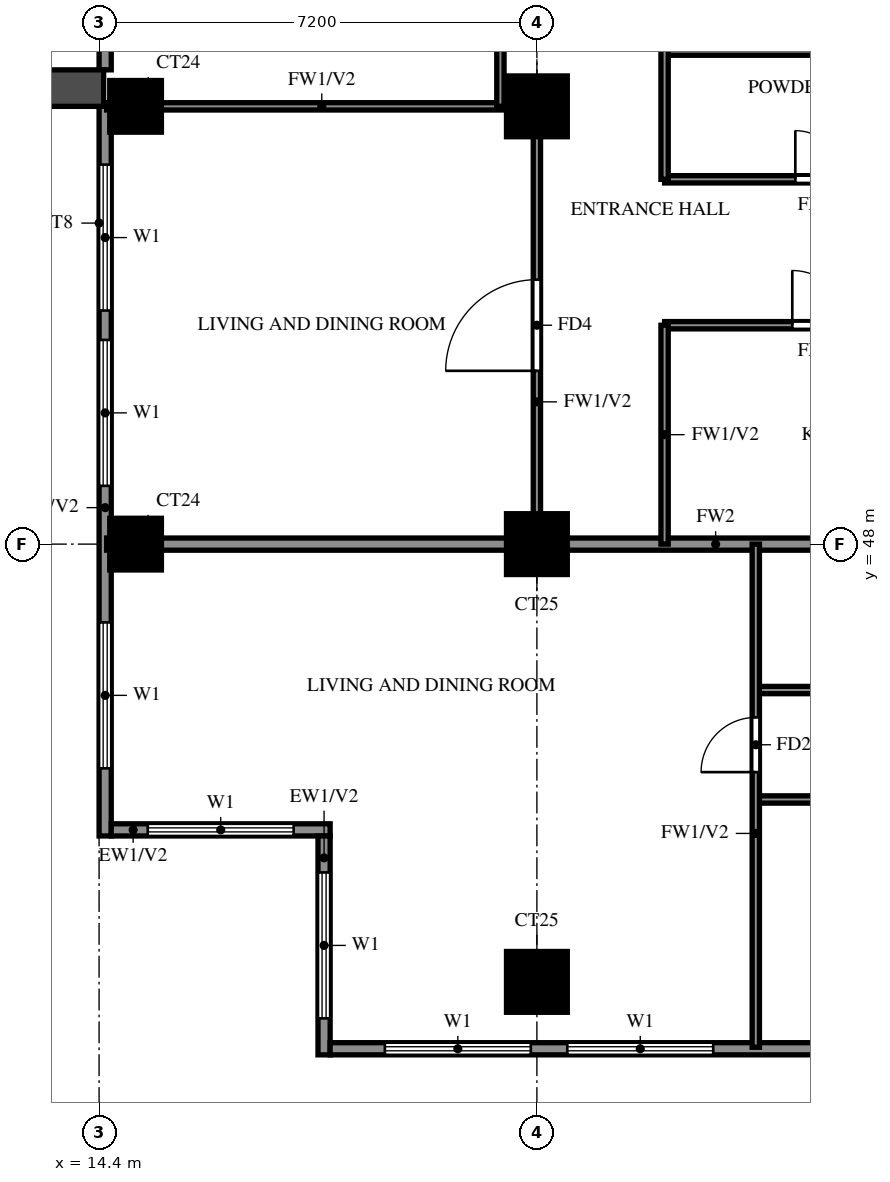
"""IFC4 building model, lengths in metres.
Left out: names, types, materials, properties, quantities, classifications, styles, units other than length and angle.
Written with IfcOpenShell. Run it as: python <this file> out.ifc"""

import sys

from ifc_helpers import new_model, si_unit, direction, frame, frame_2d, origin, origin_2d, place, context, subcontext, project, spatial, rectangle, extrude, source, transform, mapped, element, fill, save


model = new_model("IFC4")
c1 = context("Model", 3, precision=1e-05, world=origin(), true_north=direction((0.0, 1.0)))
c2 = subcontext(c1, "Body", "Model", "MODEL_VIEW")
j1 = project(units=[si_unit("LENGTHUNIT", "METRE"), si_unit("PLANEANGLEUNIT", "RADIAN")], contexts=[c1])
p1 = place(None, origin())
s1 = spatial("IfcSite", under=j1, at=p1, CompositionType="ELEMENT")
p2 = place(p1, origin())
s2 = spatial("IfcBuilding", under=s1, at=p2, CompositionType="ELEMENT")
p3 = place(p2, frame((0.0, 0.0, 143.0)))
s3 = spatial("IfcBuildingStorey", under=s2, at=p3, CompositionType="ELEMENT", Elevation=143.0)
m1 = source(origin(), c2, "Body", "SweptSolid", [
    extrude(rectangle(XDim=1.0, YDim=1.0, at=origin_2d()), origin(), (0.0, 0.0, 1.0), 3.2),
])
p4 = place(p3, frame((21.6, 40.8, 0.0), z_axis=(0.0, 0.0, 1.0), x_axis=(1.0, 0.0, 0.0)))
e1 = element("IfcColumn", 1, at=p4, inside=s3, PredefinedType="COLUMN", context=c2, shape_type="MappedRepresentation", body=[
    mapped(m1, transform((0.0, 0.0, 0.0))),
])
m2 = source(origin(), c2, "Body", "SweptSolid", [
    extrude(rectangle(XDim=0.85, YDim=0.85, at=origin_2d()), origin(), (0.0, 0.0, 1.0), 3.2),
])
p5 = place(p3, frame((15.0, 48.0, 0.0), z_axis=(0.0, 0.0, 1.0), x_axis=(1.0, 0.0, 0.0)))
e2 = element("IfcColumn", 2, at=p5, inside=s3, PredefinedType="COLUMN", context=c2, shape_type="MappedRepresentation", body=[
    mapped(m2, transform((0.0, 0.0, 0.0))),
])
p6 = place(p3, frame((21.6, 48.0, 0.0), z_axis=(0.0, 0.0, 1.0), x_axis=(1.0, 0.0, 0.0)))
e3 = element("IfcColumn", 3, at=p6, inside=s3, PredefinedType="COLUMN", context=c2, shape_type="MappedRepresentation", body=[
    mapped(m1, transform((0.0, 0.0, 0.0))),
])
p7 = place(p3, frame((15.0, 55.2, 0.0), z_axis=(0.0, 0.0, 1.0), x_axis=(1.0, 0.0, 0.0)))
e4 = element("IfcColumn", 4, at=p7, inside=s3, PredefinedType="COLUMN", context=c2, shape_type="MappedRepresentation", body=[
    mapped(m2, transform((0.0, 0.0, 0.0))),
])
p8 = place(p3, frame((21.6, 55.2, 0.0), z_axis=(0.0, 0.0, 1.0), x_axis=(1.0, 0.0, 0.0)))
e5 = element("IfcColumn", 5, at=p8, inside=s3, PredefinedType="COLUMN", context=c2, shape_type="MappedRepresentation", body=[
    mapped(m1, transform((0.0, 0.0, 0.0))),
])
p9 = place(p3, frame((14.5, 61.8, 0.0), z_axis=(0.0, 0.0, 1.0), x_axis=(0.0, -1.0, 0.0)))
e6 = element("IfcWall", 6, at=p9, inside=s3, PredefinedType="SOLIDWALL", context=c2, shape_type="SweptSolid", body=[
    extrude(rectangle(XDim=6.0, YDim=0.2, at=frame_2d((3.0, 0.0))), origin(), (0.0, 0.0, 1.0), 3.2),
])
p10 = place(p9, frame((0.9, 0.0, 0.0)))
e7 = element("IfcOpeningElement", 7, at=p10, cuts=e6, PredefinedType="OPENING", context=c2, shape_type="SweptSolid", body=[
    extrude(rectangle(XDim=1.8, YDim=2.4, at=frame_2d((0.9, 1.2))), frame((0.0, 0.11, 0.0), z_axis=(0.0, -1.0, 0.0), x_axis=(1.0, 0.0, 0.0)), (0.0, 0.0, 1.0), 0.22),
])
p11 = place(p9, frame((3.95, 0.0, 1.5)))
e8 = element("IfcOpeningElement", 8, at=p11, cuts=e6, PredefinedType="OPENING", context=c2, shape_type="SweptSolid", body=[
    extrude(rectangle(XDim=0.9, YDim=0.9, at=frame_2d((0.45, 0.45))), frame((0.0, 0.11, 0.0), z_axis=(0.0, -1.0, 0.0), x_axis=(1.0, 0.0, 0.0)), (0.0, 0.0, 1.0), 0.22),
])
p12 = place(p3, frame((14.5, 55.2, 0.0), z_axis=(0.0, 0.0, 1.0), x_axis=(0.0, -1.0, 0.0)))
e9 = element("IfcWall", 9, at=p12, inside=s3, PredefinedType="SOLIDWALL", context=c2, shape_type="SweptSolid", body=[
    extrude(rectangle(XDim=12.0, YDim=0.2, at=frame_2d((6.0, 0.0))), origin(), (0.0, 0.0, 1.0), 3.2),
])
p13 = place(p12, frame((8.488, 0.0, 0.6)))
e10 = element("IfcOpeningElement", 10, at=p13, cuts=e9, PredefinedType="OPENING", context=c2, shape_type="SweptSolid", body=[
    extrude(rectangle(XDim=2.4, YDim=2.4, at=frame_2d((1.2, 1.2))), frame((0.0, 0.11, 0.0), z_axis=(0.0, -1.0, 0.0), x_axis=(1.0, 0.0, 0.0)), (0.0, 0.0, 1.0), 0.22),
])
p14 = place(p12, frame((0.958, 0.0, 0.6)))
e11 = element("IfcOpeningElement", 11, at=p14, cuts=e9, PredefinedType="OPENING", context=c2, shape_type="SweptSolid", body=[
    extrude(rectangle(XDim=2.4, YDim=2.4, at=frame_2d((1.2, 1.2))), frame((0.0, 0.11, 0.0), z_axis=(0.0, -1.0, 0.0), x_axis=(1.0, 0.0, 0.0)), (0.0, 0.0, 1.0), 0.22),
])
p15 = place(p12, frame((3.842, 0.0, 0.6)))
e12 = element("IfcOpeningElement", 12, at=p15, cuts=e9, PredefinedType="OPENING", context=c2, shape_type="SweptSolid", body=[
    extrude(rectangle(XDim=2.4, YDim=2.4, at=frame_2d((1.2, 1.2))), frame((0.0, 0.11, 0.0), z_axis=(0.0, -1.0, 0.0), x_axis=(1.0, 0.0, 0.0)), (0.0, 0.0, 1.0), 0.22),
])
p16 = place(p3, frame((14.6, 43.3, 0.0), z_axis=(0.0, 0.0, 1.0), x_axis=(1.0, 0.0, 0.0)))
e13 = element("IfcWall", 13, at=p16, inside=s3, PredefinedType="SOLIDWALL", context=c2, shape_type="SweptSolid", body=[
    extrude(rectangle(XDim=3.6, YDim=0.2, at=frame_2d((1.8, 0.0))), origin(), (0.0, 0.0, 1.0), 3.2),
])
p17 = place(p16, frame((0.6, 0.0, 0.6)))
e14 = element("IfcOpeningElement", 14, at=p17, cuts=e13, PredefinedType="OPENING", context=c2, shape_type="SweptSolid", body=[
    extrude(rectangle(XDim=2.4, YDim=2.4, at=frame_2d((1.2, 1.2))), frame((0.0, 0.11, 0.0), z_axis=(0.0, -1.0, 0.0), x_axis=(1.0, 0.0, 0.0)), (0.0, 0.0, 1.0), 0.22),
])
p18 = place(p3, frame((18.1, 43.2, 0.0), z_axis=(0.0, 0.0, 1.0), x_axis=(0.0, -1.0, 0.0)))
e15 = element("IfcWall", 15, at=p18, inside=s3, PredefinedType="SOLIDWALL", context=c2, shape_type="SweptSolid", body=[
    extrude(rectangle(XDim=3.6, YDim=0.2, at=frame_2d((1.8, 0.0))), origin(), (0.0, 0.0, 1.0), 3.2),
])
p19 = place(p18, frame((0.6, 0.0, 0.6)))
e16 = element("IfcOpeningElement", 16, at=p19, cuts=e15, PredefinedType="OPENING", context=c2, shape_type="SweptSolid", body=[
    extrude(rectangle(XDim=2.4, YDim=2.4, at=frame_2d((1.2, 1.2))), frame((0.0, 0.11, 0.0), z_axis=(0.0, -1.0, 0.0), x_axis=(1.0, 0.0, 0.0)), (0.0, 0.0, 1.0), 0.22),
])
p20 = place(p3, frame((18.2, 39.7, 0.0), z_axis=(0.0, 0.0, 1.0), x_axis=(1.0, 0.0, 0.0)))
e17 = element("IfcWall", 17, at=p20, inside=s3, PredefinedType="SOLIDWALL", context=c2, shape_type="SweptSolid", body=[
    extrude(rectangle(XDim=23.8, YDim=0.2, at=frame_2d((11.9, 0.0))), origin(), (0.0, 0.0, 1.0), 3.2),
])
p21 = place(p20, frame((0.9, 0.0, 0.6)))
e18 = element("IfcOpeningElement", 18, at=p21, cuts=e17, PredefinedType="OPENING", context=c2, shape_type="SweptSolid", body=[
    extrude(rectangle(XDim=2.4, YDim=2.4, at=frame_2d((1.2, 1.2))), frame((0.0, 0.11, 0.0), z_axis=(0.0, -1.0, 0.0), x_axis=(1.0, 0.0, 0.0)), (0.0, 0.0, 1.0), 0.22),
])
p22 = place(p20, frame((3.9, 0.0, 0.6)))
e19 = element("IfcOpeningElement", 19, at=p22, cuts=e17, PredefinedType="OPENING", context=c2, shape_type="SweptSolid", body=[
    extrude(rectangle(XDim=2.4, YDim=2.4, at=frame_2d((1.2, 1.2))), frame((0.0, 0.11, 0.0), z_axis=(0.0, -1.0, 0.0), x_axis=(1.0, 0.0, 0.0)), (0.0, 0.0, 1.0), 0.22),
])
p23 = place(p20, frame((8.35, 0.0, 1.5)))
e20 = element("IfcOpeningElement", 20, at=p23, cuts=e17, PredefinedType="OPENING", context=c2, shape_type="SweptSolid", body=[
    extrude(rectangle(XDim=0.9, YDim=0.9, at=frame_2d((0.45, 0.45))), frame((0.0, 0.11, 0.0), z_axis=(0.0, -1.0, 0.0), x_axis=(1.0, 0.0, 0.0)), (0.0, 0.0, 1.0), 0.22),
])
p24 = place(p20, frame((11.8, 0.0, 0.6)))
e21 = element("IfcOpeningElement", 21, at=p24, cuts=e17, PredefinedType="OPENING", context=c2, shape_type="SweptSolid", body=[
    extrude(rectangle(XDim=2.4, YDim=2.4, at=frame_2d((1.2, 1.2))), frame((0.0, 0.11, 0.0), z_axis=(0.0, -1.0, 0.0), x_axis=(1.0, 0.0, 0.0)), (0.0, 0.0, 1.0), 0.22),
])
p25 = place(p3, frame((14.475, 55.5, 0.0), z_axis=(0.0, 0.0, 1.0), x_axis=(-1.0, 0.0, 0.0)))
e22 = element("IfcWall", 22, at=p25, inside=s3, PredefinedType="SOLIDWALL", context=c2, shape_type="SweptSolid", body=[
    extrude(rectangle(XDim=2.775, YDim=0.6, at=frame_2d((1.388, 0.0))), origin(), (0.0, 0.0, 1.0), 2.85),
])
p26 = place(p3, frame((14.525, 48.0, 0.0), z_axis=(0.0, 0.0, 1.0), x_axis=(1.0, 0.0, 0.0)))
e23 = element("IfcWall", 23, at=p26, inside=s3, PredefinedType="SOLIDWALL", context=c2, shape_type="SweptSolid", body=[
    extrude(rectangle(XDim=19.075, YDim=0.2, at=frame_2d((9.538, 0.0))), origin(), (0.0, 0.0, 1.0), 3.2),
])
p27 = place(p3, frame((25.2, 43.8, 0.0), z_axis=(0.0, 0.0, 1.0), x_axis=(1.0, 0.0, 0.0)))
e24 = element("IfcWall", 24, at=p27, inside=s3, PredefinedType="PARTITIONING", context=c2, shape_type="SweptSolid", body=[
    extrude(rectangle(XDim=8.4, YDim=0.12, at=frame_2d((4.2, 0.0))), origin(), (0.0, 0.0, 1.0), 3.2),
])
p28 = place(p27, frame((1.35, 0.0, 0.0)))
e25 = element("IfcOpeningElement", 25, at=p28, cuts=e24, PredefinedType="OPENING", context=c2, shape_type="SweptSolid", body=[
    extrude(rectangle(XDim=0.9, YDim=2.1, at=frame_2d((0.45, 1.05))), frame((0.0, 0.07, 0.0), z_axis=(0.0, -1.0, 0.0), x_axis=(1.0, 0.0, 0.0)), (0.0, 0.0, 1.0), 0.14),
])
p29 = place(p27, frame((5.55, 0.0, 0.0)))
e26 = element("IfcOpeningElement", 26, at=p29, cuts=e24, PredefinedType="OPENING", context=c2, shape_type="SweptSolid", body=[
    extrude(rectangle(XDim=0.9, YDim=2.1, at=frame_2d((0.45, 1.05))), frame((0.0, 0.07, 0.0), z_axis=(0.0, -1.0, 0.0), x_axis=(1.0, 0.0, 0.0)), (0.0, 0.0, 1.0), 0.14),
])
p30 = place(p3, frame((25.2, 45.6, 0.0), z_axis=(0.0, 0.0, 1.0), x_axis=(1.0, 0.0, 0.0)))
e27 = element("IfcWall", 27, at=p30, inside=s3, PredefinedType="PARTITIONING", context=c2, shape_type="SweptSolid", body=[
    extrude(rectangle(XDim=6.0, YDim=0.12, at=frame_2d((3.0, 0.0))), origin(), (0.0, 0.0, 1.0), 3.2),
])
p31 = place(p30, frame((2.55, 0.0, 0.0)))
e28 = element("IfcOpeningElement", 28, at=p31, cuts=e27, PredefinedType="OPENING", context=c2, shape_type="SweptSolid", body=[
    extrude(rectangle(XDim=0.9, YDim=2.1, at=frame_2d((0.45, 1.05))), frame((0.0, 0.07, 0.0), z_axis=(0.0, -1.0, 0.0), x_axis=(1.0, 0.0, 0.0)), (0.0, 0.0, 1.0), 0.14),
])
p32 = place(p3, frame((23.7, 51.6, 0.0), z_axis=(0.0, 0.0, 1.0), x_axis=(1.0, 0.0, 0.0)))
e29 = element("IfcWall", 29, at=p32, inside=s3, PredefinedType="PARTITIONING", context=c2, shape_type="SweptSolid", body=[
    extrude(rectangle(XDim=9.9, YDim=0.12, at=frame_2d((4.95, 0.0))), origin(), (0.0, 0.0, 1.0), 3.2),
])
p33 = place(p32, frame((2.1, 0.0, 0.0)))
e30 = element("IfcOpeningElement", 30, at=p33, cuts=e29, PredefinedType="OPENING", context=c2, shape_type="SweptSolid", body=[
    extrude(rectangle(XDim=0.9, YDim=2.1, at=frame_2d((0.45, 1.05))), frame((0.0, 0.07, 0.0), z_axis=(0.0, -1.0, 0.0), x_axis=(1.0, 0.0, 0.0)), (0.0, 0.0, 1.0), 0.14),
])
p34 = place(p32, frame((7.05, 0.0, 0.0)))
e31 = element("IfcOpeningElement", 31, at=p34, cuts=e29, PredefinedType="OPENING", context=c2, shape_type="SweptSolid", body=[
    extrude(rectangle(XDim=0.9, YDim=2.1, at=frame_2d((0.45, 1.05))), frame((0.0, 0.07, 0.0), z_axis=(0.0, -1.0, 0.0), x_axis=(1.0, 0.0, 0.0)), (0.0, 0.0, 1.0), 0.14),
])
p35 = place(p3, frame((23.7, 54.0, 0.0), z_axis=(0.0, 0.0, 1.0), x_axis=(1.0, 0.0, 0.0)))
e32 = element("IfcWall", 32, at=p35, inside=s3, PredefinedType="PARTITIONING", context=c2, shape_type="SweptSolid", body=[
    extrude(rectangle(XDim=9.9, YDim=0.12, at=frame_2d((4.95, 0.0))), origin(), (0.0, 0.0, 1.0), 3.2),
])
p36 = place(p35, frame((2.15, 0.0, 0.0)))
e33 = element("IfcOpeningElement", 33, at=p36, cuts=e32, PredefinedType="OPENING", context=c2, shape_type="SweptSolid", body=[
    extrude(rectangle(XDim=0.8, YDim=2.1, at=frame_2d((0.4, 1.05))), frame((0.0, 0.07, 0.0), z_axis=(0.0, -1.0, 0.0), x_axis=(1.0, 0.0, 0.0)), (0.0, 0.0, 1.0), 0.14),
])
p37 = place(p35, frame((7.05, 0.0, 0.0)))
e34 = element("IfcOpeningElement", 34, at=p37, cuts=e32, PredefinedType="OPENING", context=c2, shape_type="SweptSolid", body=[
    extrude(rectangle(XDim=0.9, YDim=2.1, at=frame_2d((0.45, 1.05))), frame((0.0, 0.07, 0.0), z_axis=(0.0, -1.0, 0.0), x_axis=(1.0, 0.0, 0.0)), (0.0, 0.0, 1.0), 0.14),
])
p38 = place(p3, frame((14.525, 55.2, 0.0), z_axis=(0.0, 0.0, 1.0), x_axis=(1.0, 0.0, 0.0)))
e35 = element("IfcWall", 35, at=p38, inside=s3, PredefinedType="PARTITIONING", context=c2, shape_type="SweptSolid", body=[
    extrude(rectangle(XDim=7.075, YDim=0.12, at=frame_2d((3.538, 0.0))), origin(), (0.0, 0.0, 1.0), 3.2),
])
p39 = place(p3, frame((23.7, 56.1, 0.0), z_axis=(0.0, 0.0, 1.0), x_axis=(1.0, 0.0, 0.0)))
e36 = element("IfcWall", 36, at=p39, inside=s3, PredefinedType="PARTITIONING", context=c2, shape_type="SweptSolid", body=[
    extrude(rectangle(XDim=5.1, YDim=0.12, at=frame_2d((2.55, 0.0))), origin(), (0.0, 0.0, 1.0), 3.2),
])
p40 = place(p3, frame((21.0, 55.2, 0.0), z_axis=(0.0, 0.0, 1.0), x_axis=(0.0, 1.0, 0.0)))
e37 = element("IfcWall", 37, at=p40, inside=s3, PredefinedType="PARTITIONING", context=c2, shape_type="SweptSolid", body=[
    extrude(rectangle(XDim=3.6, YDim=0.12, at=frame_2d((1.8, 0.0))), origin(), (0.0, 0.0, 1.0), 3.2),
])
p41 = place(p3, frame((21.6, 48.0, 0.0), z_axis=(0.0, 0.0, 1.0), x_axis=(0.0, 1.0, 0.0)))
e38 = element("IfcWall", 38, at=p41, inside=s3, PredefinedType="PARTITIONING", context=c2, shape_type="SweptSolid", body=[
    extrude(rectangle(XDim=7.2, YDim=0.12, at=frame_2d((3.6, 0.0))), origin(), (0.0, 0.0, 1.0), 3.2),
])
p42 = place(p41, frame((2.85, 0.0, 0.0)))
e39 = element("IfcOpeningElement", 39, at=p42, cuts=e38, PredefinedType="OPENING", context=c2, shape_type="SweptSolid", body=[
    extrude(rectangle(XDim=1.5, YDim=2.1, at=frame_2d((0.75, 1.05))), frame((0.0, 0.07, 0.0), z_axis=(0.0, -1.0, 0.0), x_axis=(1.0, 0.0, 0.0)), (0.0, 0.0, 1.0), 0.14),
])
p43 = place(p3, frame((23.7, 48.0, 0.0), z_axis=(0.0, 0.0, 1.0), x_axis=(0.0, 1.0, 0.0)))
e40 = element("IfcWall", 40, at=p43, inside=s3, PredefinedType="PARTITIONING", context=c2, shape_type="SweptSolid", body=[
    extrude(rectangle(XDim=3.6, YDim=0.12, at=frame_2d((1.8, 0.0))), origin(), (0.0, 0.0, 1.0), 3.2),
])
p44 = place(p3, frame((23.7, 54.0, 0.0), z_axis=(0.0, 0.0, 1.0), x_axis=(0.0, 1.0, 0.0)))
e41 = element("IfcWall", 41, at=p44, inside=s3, PredefinedType="PARTITIONING", context=c2, shape_type="SweptSolid", body=[
    extrude(rectangle(XDim=6.0, YDim=0.12, at=frame_2d((3.0, 0.0))), origin(), (0.0, 0.0, 1.0), 3.2),
])
p45 = place(p44, frame((3.65, 0.0, 0.0)))
e42 = element("IfcOpeningElement", 42, at=p45, cuts=e41, PredefinedType="OPENING", context=c2, shape_type="SweptSolid", body=[
    extrude(rectangle(XDim=0.8, YDim=2.1, at=frame_2d((0.4, 1.05))), frame((0.0, 0.07, 0.0), z_axis=(0.0, -1.0, 0.0), x_axis=(1.0, 0.0, 0.0)), (0.0, 0.0, 1.0), 0.14),
])
p46 = place(p3, frame((25.2, 39.725, 0.0), z_axis=(0.0, 0.0, 1.0), x_axis=(0.0, 1.0, 0.0)))
e43 = element("IfcWall", 43, at=p46, inside=s3, PredefinedType="PARTITIONING", context=c2, shape_type="SweptSolid", body=[
    extrude(rectangle(XDim=8.275, YDim=0.12, at=frame_2d((4.137, 0.0))), origin(), (0.0, 0.0, 1.0), 3.2),
])
p47 = place(p46, frame((4.525, 0.0, 0.0)))
e44 = element("IfcOpeningElement", 44, at=p47, cuts=e43, PredefinedType="OPENING", context=c2, shape_type="SweptSolid", body=[
    extrude(rectangle(XDim=0.9, YDim=2.1, at=frame_2d((0.45, 1.05))), frame((0.0, 0.07, 0.0), z_axis=(0.0, -1.0, 0.0), x_axis=(1.0, 0.0, 0.0)), (0.0, 0.0, 1.0), 0.14),
])
p48 = place(p13, origin())
e45 = element("IfcWindow", 45, at=p48, inside=s3, PartitioningType="DOUBLE_PANEL_VERTICAL", PredefinedType="WINDOW", context=c2, shape_type="SweptSolid", body=[
    extrude(rectangle(XDim=2.4, YDim=2.4, at=frame_2d((1.2, 1.2))), frame((0.0, 0.03, 0.0), z_axis=(0.0, -1.0, 0.0), x_axis=(1.0, 0.0, 0.0)), (0.0, 0.0, 1.0), 0.06),
])
fill(e10, e45)
p49 = place(p14, origin())
e46 = element("IfcWindow", 46, at=p49, inside=s3, PartitioningType="DOUBLE_PANEL_VERTICAL", PredefinedType="WINDOW", context=c2, shape_type="SweptSolid", body=[
    extrude(rectangle(XDim=2.4, YDim=2.4, at=frame_2d((1.2, 1.2))), frame((0.0, 0.03, 0.0), z_axis=(0.0, -1.0, 0.0), x_axis=(1.0, 0.0, 0.0)), (0.0, 0.0, 1.0), 0.06),
])
fill(e11, e46)
p50 = place(p15, origin())
e47 = element("IfcWindow", 47, at=p50, inside=s3, PartitioningType="DOUBLE_PANEL_VERTICAL", PredefinedType="WINDOW", context=c2, shape_type="SweptSolid", body=[
    extrude(rectangle(XDim=2.4, YDim=2.4, at=frame_2d((1.2, 1.2))), frame((0.0, 0.03, 0.0), z_axis=(0.0, -1.0, 0.0), x_axis=(1.0, 0.0, 0.0)), (0.0, 0.0, 1.0), 0.06),
])
fill(e12, e47)
p51 = place(p17, origin())
e48 = element("IfcWindow", 48, at=p51, inside=s3, PartitioningType="DOUBLE_PANEL_VERTICAL", PredefinedType="WINDOW", context=c2, shape_type="SweptSolid", body=[
    extrude(rectangle(XDim=2.4, YDim=2.4, at=frame_2d((1.2, 1.2))), frame((0.0, 0.03, 0.0), z_axis=(0.0, -1.0, 0.0), x_axis=(1.0, 0.0, 0.0)), (0.0, 0.0, 1.0), 0.06),
])
fill(e14, e48)
p52 = place(p19, origin())
e49 = element("IfcWindow", 49, at=p52, inside=s3, PartitioningType="DOUBLE_PANEL_VERTICAL", PredefinedType="WINDOW", context=c2, shape_type="SweptSolid", body=[
    extrude(rectangle(XDim=2.4, YDim=2.4, at=frame_2d((1.2, 1.2))), frame((0.0, 0.03, 0.0), z_axis=(0.0, -1.0, 0.0), x_axis=(1.0, 0.0, 0.0)), (0.0, 0.0, 1.0), 0.06),
])
fill(e16, e49)
p53 = place(p21, origin())
e50 = element("IfcWindow", 50, at=p53, inside=s3, PartitioningType="DOUBLE_PANEL_VERTICAL", PredefinedType="WINDOW", context=c2, shape_type="SweptSolid", body=[
    extrude(rectangle(XDim=2.4, YDim=2.4, at=frame_2d((1.2, 1.2))), frame((0.0, 0.03, 0.0), z_axis=(0.0, -1.0, 0.0), x_axis=(1.0, 0.0, 0.0)), (0.0, 0.0, 1.0), 0.06),
])
fill(e18, e50)
p54 = place(p22, origin())
e51 = element("IfcWindow", 51, at=p54, inside=s3, PartitioningType="DOUBLE_PANEL_VERTICAL", PredefinedType="WINDOW", context=c2, shape_type="SweptSolid", body=[
    extrude(rectangle(XDim=2.4, YDim=2.4, at=frame_2d((1.2, 1.2))), frame((0.0, 0.03, 0.0), z_axis=(0.0, -1.0, 0.0), x_axis=(1.0, 0.0, 0.0)), (0.0, 0.0, 1.0), 0.06),
])
fill(e19, e51)
p55 = place(p47, origin())
e52 = element("IfcDoor", 52, at=p55, inside=s3, OperationType="SINGLE_SWING_LEFT", PredefinedType="DOOR", context=c2, shape_type="SweptSolid", body=[
    extrude(rectangle(XDim=0.9, YDim=2.1, at=frame_2d((0.45, 1.05))), frame((0.0, 0.025, 0.0), z_axis=(0.0, -1.0, 0.0), x_axis=(1.0, 0.0, 0.0)), (0.0, 0.0, 1.0), 0.05),
])
fill(e44, e52)
p56 = place(p42, origin())
e53 = element("IfcDoor", 53, at=p56, inside=s3, OperationType="SINGLE_SWING_LEFT", PredefinedType="DOOR", context=c2, shape_type="SweptSolid", body=[
    extrude(rectangle(XDim=1.5, YDim=2.1, at=frame_2d((0.75, 1.05))), frame((0.0, 0.025, 0.0), z_axis=(0.0, -1.0, 0.0), x_axis=(1.0, 0.0, 0.0)), (0.0, 0.0, 1.0), 0.05),
])
fill(e39, e53)
p57 = place(p33, origin())
e54 = element("IfcDoor", 54, at=p57, inside=s3, OperationType="SINGLE_SWING_LEFT", PredefinedType="DOOR", context=c2, shape_type="SweptSolid", body=[
    extrude(rectangle(XDim=0.9, YDim=2.1, at=frame_2d((0.45, 1.05))), frame((0.0, 0.025, 0.0), z_axis=(0.0, -1.0, 0.0), x_axis=(1.0, 0.0, 0.0)), (0.0, 0.0, 1.0), 0.05),
])
fill(e30, e54)
p58 = place(p36, origin())
e55 = element("IfcDoor", 55, at=p58, inside=s3, OperationType="SINGLE_SWING_RIGHT", PredefinedType="DOOR", context=c2, shape_type="SweptSolid", body=[
    extrude(rectangle(XDim=0.8, YDim=2.1, at=frame_2d((0.4, 1.05))), frame((0.0, 0.025, 0.0), z_axis=(0.0, -1.0, 0.0), x_axis=(1.0, 0.0, 0.0)), (0.0, 0.0, 1.0), 0.05),
])
fill(e33, e55)
save(model, sys.argv[1])
